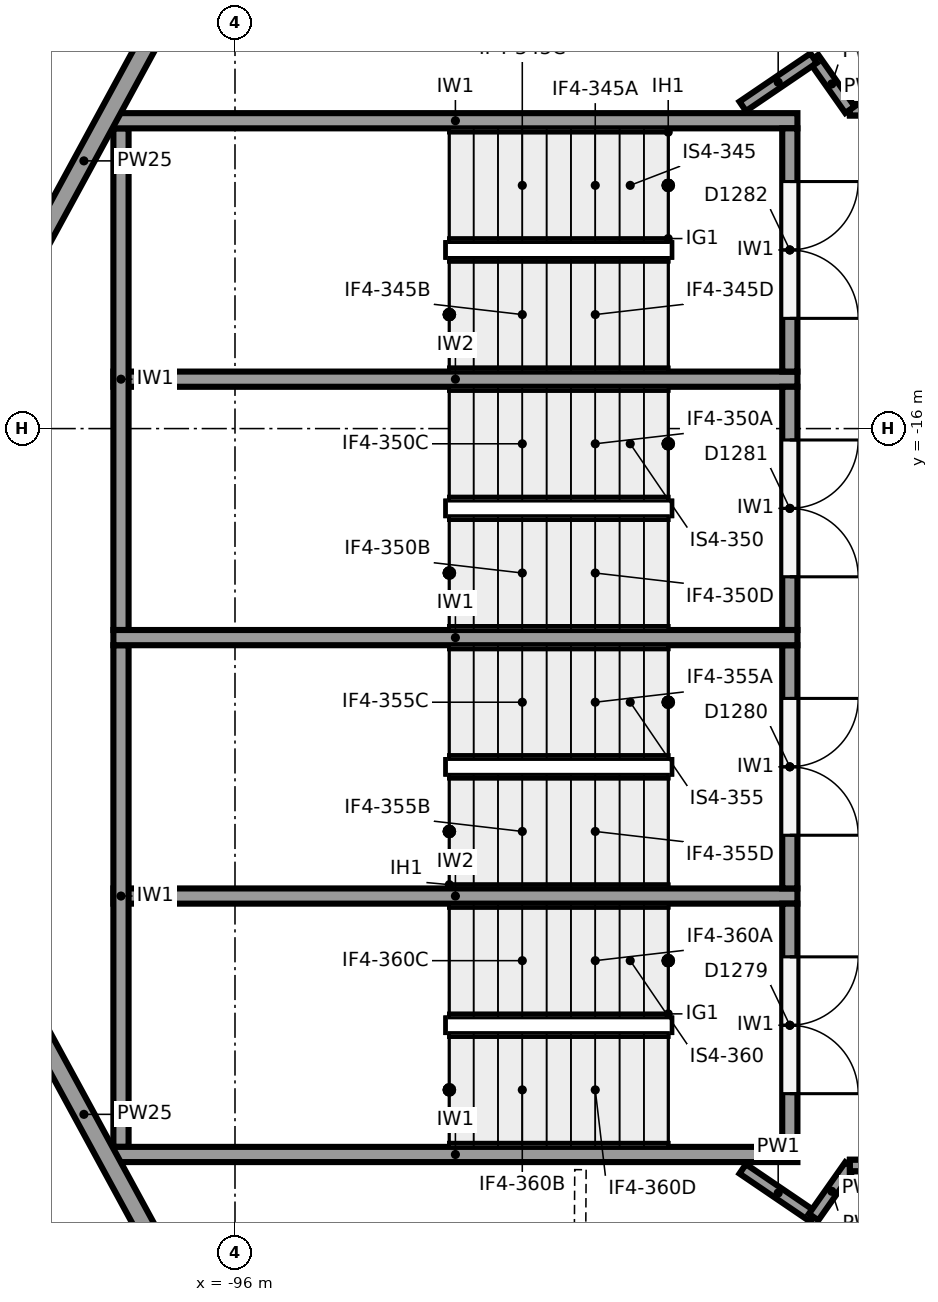
"""IFC4 building model, lengths in metres.
Left out: names, types, materials, properties, quantities, classifications, styles, units other than length and angle.
Written with IfcOpenShell. Run it as: python <this file> out.ifc"""

import sys

from ifc_helpers import new_model, si_unit, direction, frame, frame_2d, origin, place, context, subcontext, project, spatial, rectangle, extrude, element, fill, save


model = new_model("IFC4")
c1 = context("Model", 3, precision=1e-05, world=origin(), true_north=direction((0.0, 1.0)))
c2 = subcontext(c1, "Body", "Model", "MODEL_VIEW")
j1 = project(units=[si_unit("LENGTHUNIT", "METRE"), si_unit("PLANEANGLEUNIT", "RADIAN")], contexts=[c1])
p1 = place(None, origin())
s1 = spatial("IfcSite", under=j1, at=p1, CompositionType="ELEMENT")
p2 = place(p1, origin())
s2 = spatial("IfcBuilding", under=s1, at=p2, CompositionType="ELEMENT")
p3 = place(p2, frame((0.0, 0.0, 18.0)))
s3 = spatial("IfcBuildingStorey", under=s2, at=p3, CompositionType="ELEMENT", Elevation=18.0)
p4 = place(p3, frame((-101.161, -18.311, 0.0), z_axis=(0.0, 0.0, 1.0), x_axis=(0.477867771117, 0.878431780691, 0.0)))
e1 = element("IfcWall", 1, at=p4, inside=s3, PredefinedType="SOLIDWALL", context=c2, shape_type="SweptSolid", body=[
    extrude(rectangle(XDim=13.28, YDim=0.25, at=frame_2d((6.64, 0.0))), origin(), (0.0, 0.0, 1.0), 4.3),
])
p5 = place(p4, frame((11.63, 0.0, 1.0)))
e2 = element("IfcOpeningElement", 2, at=p5, cuts=e1, PredefinedType="OPENING", context=c2, shape_type="SweptSolid", body=[
    extrude(rectangle(XDim=0.9, YDim=3.25, at=frame_2d((0.45, 1.625))), frame((0.0, 0.135, 0.0), z_axis=(0.0, -1.0, 0.0), x_axis=(1.0, 0.0, 0.0)), (0.0, 0.0, 1.0), 0.27),
])
p6 = place(p4, frame((9.53, 0.0, 1.0)))
e3 = element("IfcOpeningElement", 3, at=p6, cuts=e1, PredefinedType="OPENING", context=c2, shape_type="SweptSolid", body=[
    extrude(rectangle(XDim=0.9, YDim=3.25, at=frame_2d((0.45, 1.625))), frame((0.0, 0.135, 0.0), z_axis=(0.0, -1.0, 0.0), x_axis=(1.0, 0.0, 0.0)), (0.0, 0.0, 1.0), 0.27),
])
p7 = place(p4, frame((1.13, 0.0, 1.0)))
e4 = element("IfcOpeningElement", 4, at=p7, cuts=e1, PredefinedType="OPENING", context=c2, shape_type="SweptSolid", body=[
    extrude(rectangle(XDim=0.9, YDim=3.25, at=frame_2d((0.45, 1.625))), frame((0.0, 0.135, 0.0), z_axis=(0.0, -1.0, 0.0), x_axis=(1.0, 0.0, 0.0)), (0.0, 0.0, 1.0), 0.27),
])
p8 = place(p3, frame((-94.815, -30.855, 0.0), z_axis=(0.0, 0.0, 1.0), x_axis=(-0.477867771117, 0.878431780691, 0.0)))
e5 = element("IfcWall", 5, at=p8, inside=s3, PredefinedType="SOLIDWALL", context=c2, shape_type="SweptSolid", body=[
    extrude(rectangle(XDim=13.28, YDim=0.25, at=frame_2d((6.64, 0.0))), origin(), (0.0, 0.0, 1.0), 4.3),
])
p9 = place(p8, frame((0.75, 0.0, 1.0)))
e6 = element("IfcOpeningElement", 6, at=p9, cuts=e5, PredefinedType="OPENING", context=c2, shape_type="SweptSolid", body=[
    extrude(rectangle(XDim=0.9, YDim=3.25, at=frame_2d((0.45, 1.625))), frame((0.0, 0.135, 0.0), z_axis=(0.0, -1.0, 0.0), x_axis=(1.0, 0.0, 0.0)), (0.0, 0.0, 1.0), 0.27),
])
p10 = place(p8, frame((2.85, 0.0, 1.0)))
e7 = element("IfcOpeningElement", 7, at=p10, cuts=e5, PredefinedType="OPENING", context=c2, shape_type="SweptSolid", body=[
    extrude(rectangle(XDim=0.9, YDim=3.25, at=frame_2d((0.45, 1.625))), frame((0.0, 0.135, 0.0), z_axis=(0.0, -1.0, 0.0), x_axis=(1.0, 0.0, 0.0)), (0.0, 0.0, 1.0), 0.27),
])
p11 = place(p8, frame((11.25, 0.0, 1.0)))
e8 = element("IfcOpeningElement", 8, at=p11, cuts=e5, PredefinedType="OPENING", context=c2, shape_type="SweptSolid", body=[
    extrude(rectangle(XDim=0.9, YDim=3.25, at=frame_2d((0.45, 1.625))), frame((0.0, 0.135, 0.0), z_axis=(0.0, -1.0, 0.0), x_axis=(1.0, 0.0, 0.0)), (0.0, 0.0, 1.0), 0.27),
])
for number, where, z_axis, x_axis in (
    (9, (-97.6, -11.95, 0.0), (0.0, 0.0, 1.0), (1.0, 0.0, 0.0)),
    (10, (-97.6, -18.75, 0.0), (0.0, 0.0, 1.0), (1.0, 0.0, 0.0)),
    (11, (-97.6, -25.55, 0.0), (0.0, 0.0, 1.0), (1.0, 0.0, 0.0)),
):
    element("IfcWall", number, at=place(p3, frame(where, z_axis=z_axis, x_axis=x_axis)), inside=s3, PredefinedType="SHEAR", context=c2, shape_type="SweptSolid", body=[
        extrude(rectangle(XDim=9.0, YDim=0.2, at=frame_2d((4.5, 0.0))), origin(), (0.0, 0.0, 1.0), 5.6),
    ])
for number, where, z_axis, x_axis in (
    (12, (-97.5, -12.05, 0.0), (0.0, 0.0, 1.0), (0.0, -1.0, 0.0)),
    (13, (-97.5, -18.85, 0.0), (0.0, 0.0, 1.0), (0.0, -1.0, 0.0)),
):
    element("IfcWall", number, at=place(p3, frame(where, z_axis=z_axis, x_axis=x_axis)), inside=s3, PredefinedType="SHEAR", context=c2, shape_type="SweptSolid", body=[
        extrude(rectangle(XDim=6.6, YDim=0.2, at=frame_2d((3.3, 0.0))), origin(), (0.0, 0.0, 1.0), 5.6),
    ])
for number, where, z_axis, x_axis in (
    (14, (-97.6, -15.35, 0.0), (0.0, 0.0, 1.0), (1.0, 0.0, 0.0)),
    (15, (-97.6, -22.15, 0.0), (0.0, 0.0, 1.0), (1.0, 0.0, 0.0)),
):
    element("IfcWall", number, at=place(p3, frame(where, z_axis=z_axis, x_axis=x_axis)), inside=s3, PredefinedType="SHEAR", context=c2, shape_type="SweptSolid", body=[
        extrude(rectangle(XDim=9.0, YDim=0.2, at=frame_2d((4.5, 0.0))), origin(), (0.0, 0.0, 1.0), 5.6),
    ])
p12 = place(p3, frame((-88.7, -12.05, 0.0), z_axis=(0.0, 0.0, 1.0), x_axis=(0.0, -1.0, 0.0)))
e16 = element("IfcWall", 16, at=p12, inside=s3, PredefinedType="SHEAR", context=c2, shape_type="SweptSolid", body=[
    extrude(rectangle(XDim=3.2, YDim=0.2, at=frame_2d((1.6, 0.0))), origin(), (0.0, 0.0, 1.0), 5.6),
])
p13 = place(p12, frame((0.7, 0.0, 0.0)))
e17 = element("IfcOpeningElement", 17, at=p13, cuts=e16, PredefinedType="OPENING", context=c2, shape_type="SweptSolid", body=[
    extrude(rectangle(XDim=1.8, YDim=2.1, at=frame_2d((0.9, 1.05))), frame((0.0, 0.11, 0.0), z_axis=(0.0, -1.0, 0.0), x_axis=(1.0, 0.0, 0.0)), (0.0, 0.0, 1.0), 0.22),
])
p14 = place(p3, frame((-88.7, -15.45, 0.0), z_axis=(0.0, 0.0, 1.0), x_axis=(0.0, -1.0, 0.0)))
e18 = element("IfcWall", 18, at=p14, inside=s3, PredefinedType="SHEAR", context=c2, shape_type="SweptSolid", body=[
    extrude(rectangle(XDim=3.2, YDim=0.2, at=frame_2d((1.6, 0.0))), origin(), (0.0, 0.0, 1.0), 5.6),
])
p15 = place(p14, frame((0.7, 0.0, 0.0)))
e19 = element("IfcOpeningElement", 19, at=p15, cuts=e18, PredefinedType="OPENING", context=c2, shape_type="SweptSolid", body=[
    extrude(rectangle(XDim=1.8, YDim=2.1, at=frame_2d((0.9, 1.05))), frame((0.0, 0.11, 0.0), z_axis=(0.0, -1.0, 0.0), x_axis=(1.0, 0.0, 0.0)), (0.0, 0.0, 1.0), 0.22),
])
p16 = place(p3, frame((-88.7, -18.85, 0.0), z_axis=(0.0, 0.0, 1.0), x_axis=(0.0, -1.0, 0.0)))
e20 = element("IfcWall", 20, at=p16, inside=s3, PredefinedType="SHEAR", context=c2, shape_type="SweptSolid", body=[
    extrude(rectangle(XDim=3.2, YDim=0.2, at=frame_2d((1.6, 0.0))), origin(), (0.0, 0.0, 1.0), 5.6),
])
p17 = place(p16, frame((0.7, 0.0, 0.0)))
e21 = element("IfcOpeningElement", 21, at=p17, cuts=e20, PredefinedType="OPENING", context=c2, shape_type="SweptSolid", body=[
    extrude(rectangle(XDim=1.8, YDim=2.1, at=frame_2d((0.9, 1.05))), frame((0.0, 0.11, 0.0), z_axis=(0.0, -1.0, 0.0), x_axis=(1.0, 0.0, 0.0)), (0.0, 0.0, 1.0), 0.22),
])
p18 = place(p3, frame((-88.7, -22.25, 0.0), z_axis=(0.0, 0.0, 1.0), x_axis=(0.0, -1.0, 0.0)))
e22 = element("IfcWall", 22, at=p18, inside=s3, PredefinedType="SHEAR", context=c2, shape_type="SweptSolid", body=[
    extrude(rectangle(XDim=3.2, YDim=0.2, at=frame_2d((1.6, 0.0))), origin(), (0.0, 0.0, 1.0), 5.6),
])
p19 = place(p18, frame((0.7, 0.0, 0.0)))
e23 = element("IfcOpeningElement", 23, at=p19, cuts=e22, PredefinedType="OPENING", context=c2, shape_type="SweptSolid", body=[
    extrude(rectangle(XDim=1.8, YDim=2.1, at=frame_2d((0.9, 1.05))), frame((0.0, 0.11, 0.0), z_axis=(0.0, -1.0, 0.0), x_axis=(1.0, 0.0, 0.0)), (0.0, 0.0, 1.0), 0.22),
])
p20 = place(p3, frame((-91.455, -25.75, 0.0), z_axis=(0.0, 0.0, 1.0), x_axis=(-0.006125459352, -0.999981239198, 0.0)))
e24 = element("IfcWall", 24, at=p20, inside=s3, PredefinedType="PARTITIONING", context=c2, shape_type="SweptSolid", body=[
    extrude(rectangle(XDim=4.783, YDim=0.15, at=frame_2d((2.391, 0.0))), origin(), (0.0, 0.0, 1.0), 5.6),
])
p21 = place(p20, frame((1.95, 0.0, 0.0)))
e25 = element("IfcOpeningElement", 25, at=p21, cuts=e24, PredefinedType="OPENING", context=c2, shape_type="SweptSolid", body=[
    extrude(rectangle(XDim=1.0, YDim=2.1, at=frame_2d((0.5, 1.05))), frame((0.0, 0.085, 0.0), z_axis=(0.0, -1.0, 0.0), x_axis=(1.0, 0.0, 0.0)), (0.0, 0.0, 1.0), 0.17),
])
p22 = place(p3, frame((-89.32, -25.74, 0.0), z_axis=(0.0, 0.0, 1.0), x_axis=(0.827055308354, -0.562120553728, 0.0)))
e26 = element("IfcWall", 26, at=p22, inside=s3, PredefinedType="PARTITIONING", context=c2, shape_type="SweptSolid", body=[
    extrude(rectangle(XDim=1.128, YDim=0.15, at=frame_2d((0.564, 0.0))), origin(), (0.0, 0.0, 1.0), 5.6),
])
p23 = place(p3, frame((-88.387, -26.374, 0.0), z_axis=(0.0, 0.0, 1.0), x_axis=(0.575376756214, 0.817888493872, 0.0)))
e27 = element("IfcWall", 27, at=p23, inside=s3, PredefinedType="PARTITIONING", context=c2, shape_type="SweptSolid", body=[
    extrude(rectangle(XDim=0.83, YDim=0.15, at=frame_2d((0.415, 0.0))), origin(), (0.0, 0.0, 1.0), 5.6),
])
p24 = place(p3, frame((-87.909, -25.695, 0.0), z_axis=(0.0, 0.0, 1.0), x_axis=(1.0, 0.0, 0.0)))
e28 = element("IfcWall", 28, at=p24, inside=s3, PredefinedType="PARTITIONING", context=c2, shape_type="SweptSolid", body=[
    extrude(rectangle(XDim=3.704, YDim=0.15, at=frame_2d((1.852, 0.0))), origin(), (0.0, 0.0, 1.0), 4.5),
])
p25 = place(p24, frame((0.65, 0.0, 0.0)))
e29 = element("IfcOpeningElement", 29, at=p25, cuts=e28, PredefinedType="OPENING", context=c2, shape_type="SweptSolid", body=[
    extrude(rectangle(XDim=1.8, YDim=2.1, at=frame_2d((0.9, 1.05))), frame((0.0, 0.085, 0.0), z_axis=(0.0, -1.0, 0.0), x_axis=(1.0, 0.0, 0.0)), (0.0, 0.0, 1.0), 0.17),
])
p26 = place(p3, frame((-87.909, -25.695, 4.5), z_axis=(0.0, 0.0, 1.0), x_axis=(1.0, 0.0, 0.0)))
e30 = element("IfcWall", 30, at=p26, inside=s3, PredefinedType="PARTITIONING", context=c2, shape_type="SweptSolid", body=[
    extrude(rectangle(XDim=0.6, YDim=0.15, at=frame_2d((0.3, 0.0))), origin(), (0.0, 0.0, 1.0), 1.1),
])
p27 = place(p3, frame((-81.555, -11.805, 0.0), z_axis=(0.0, 0.0, 1.0), x_axis=(-1.0, 0.0, 0.0)))
e31 = element("IfcWall", 31, at=p27, inside=s3, PredefinedType="PARTITIONING", context=c2, shape_type="SweptSolid", body=[
    extrude(rectangle(XDim=6.354, YDim=0.15, at=frame_2d((3.177, 0.0))), origin(), (0.0, 0.0, 1.0), 4.5),
])
p28 = place(p27, frame((3.85, 0.0, 0.0)))
e32 = element("IfcOpeningElement", 32, at=p28, cuts=e31, PredefinedType="OPENING", context=c2, shape_type="SweptSolid", body=[
    extrude(rectangle(XDim=1.8, YDim=2.1, at=frame_2d((0.9, 1.05))), frame((0.0, 0.085, 0.0), z_axis=(0.0, -1.0, 0.0), x_axis=(1.0, 0.0, 0.0)), (0.0, 0.0, 1.0), 0.17),
])
p29 = place(p3, frame((-87.255, -11.805, 4.5), z_axis=(0.0, 0.0, 1.0), x_axis=(-1.0, 0.0, 0.0)))
e33 = element("IfcWall", 33, at=p29, inside=s3, PredefinedType="PARTITIONING", context=c2, shape_type="SweptSolid", body=[
    extrude(rectangle(XDim=0.654, YDim=0.15, at=frame_2d((0.327, 0.0))), origin(), (0.0, 0.0, 1.0), 1.1),
])
p30 = place(p3, frame((-87.909, -11.805, 0.0), z_axis=(0.0, 0.0, 1.0), x_axis=(-0.575573582652, 0.81774999294, 0.0)))
e34 = element("IfcWall", 34, at=p30, inside=s3, PredefinedType="PARTITIONING", context=c2, shape_type="SweptSolid", body=[
    extrude(rectangle(XDim=0.83, YDim=0.15, at=frame_2d((0.415, 0.0))), origin(), (0.0, 0.0, 1.0), 5.6),
])
p31 = place(p3, frame((-88.387, -11.126, 0.0), z_axis=(0.0, 0.0, 1.0), x_axis=(-0.827055308354, -0.562120553728, 0.0)))
e35 = element("IfcWall", 35, at=p31, inside=s3, PredefinedType="PARTITIONING", context=c2, shape_type="SweptSolid", body=[
    extrude(rectangle(XDim=1.128, YDim=0.15, at=frame_2d((0.564, 0.0))), origin(), (0.0, 0.0, 1.0), 5.6),
])
p32 = place(p13, origin())
e36 = element("IfcDoor", 36, at=p32, inside=s3, OperationType="DOUBLE_DOOR_SINGLE_SWING", PredefinedType="DOOR", context=c2, shape_type="SweptSolid", body=[
    extrude(rectangle(XDim=1.8, YDim=2.1, at=frame_2d((0.9, 1.05))), frame((0.0, 0.025, 0.0), z_axis=(0.0, -1.0, 0.0), x_axis=(1.0, 0.0, 0.0)), (0.0, 0.0, 1.0), 0.05),
])
fill(e17, e36)
p33 = place(p15, origin())
e37 = element("IfcDoor", 37, at=p33, inside=s3, OperationType="DOUBLE_DOOR_SINGLE_SWING", PredefinedType="DOOR", context=c2, shape_type="SweptSolid", body=[
    extrude(rectangle(XDim=1.8, YDim=2.1, at=frame_2d((0.9, 1.05))), frame((0.0, 0.025, 0.0), z_axis=(0.0, -1.0, 0.0), x_axis=(1.0, 0.0, 0.0)), (0.0, 0.0, 1.0), 0.05),
])
fill(e19, e37)
p34 = place(p17, origin())
e38 = element("IfcDoor", 38, at=p34, inside=s3, OperationType="DOUBLE_DOOR_SINGLE_SWING", PredefinedType="DOOR", context=c2, shape_type="SweptSolid", body=[
    extrude(rectangle(XDim=1.8, YDim=2.1, at=frame_2d((0.9, 1.05))), frame((0.0, 0.025, 0.0), z_axis=(0.0, -1.0, 0.0), x_axis=(1.0, 0.0, 0.0)), (0.0, 0.0, 1.0), 0.05),
])
fill(e21, e38)
p35 = place(p19, origin())
e39 = element("IfcDoor", 39, at=p35, inside=s3, OperationType="DOUBLE_DOOR_SINGLE_SWING", PredefinedType="DOOR", context=c2, shape_type="SweptSolid", body=[
    extrude(rectangle(XDim=1.8, YDim=2.1, at=frame_2d((0.9, 1.05))), frame((0.0, 0.025, 0.0), z_axis=(0.0, -1.0, 0.0), x_axis=(1.0, 0.0, 0.0)), (0.0, 0.0, 1.0), 0.05),
])
fill(e23, e39)
save(model, sys.argv[1])
